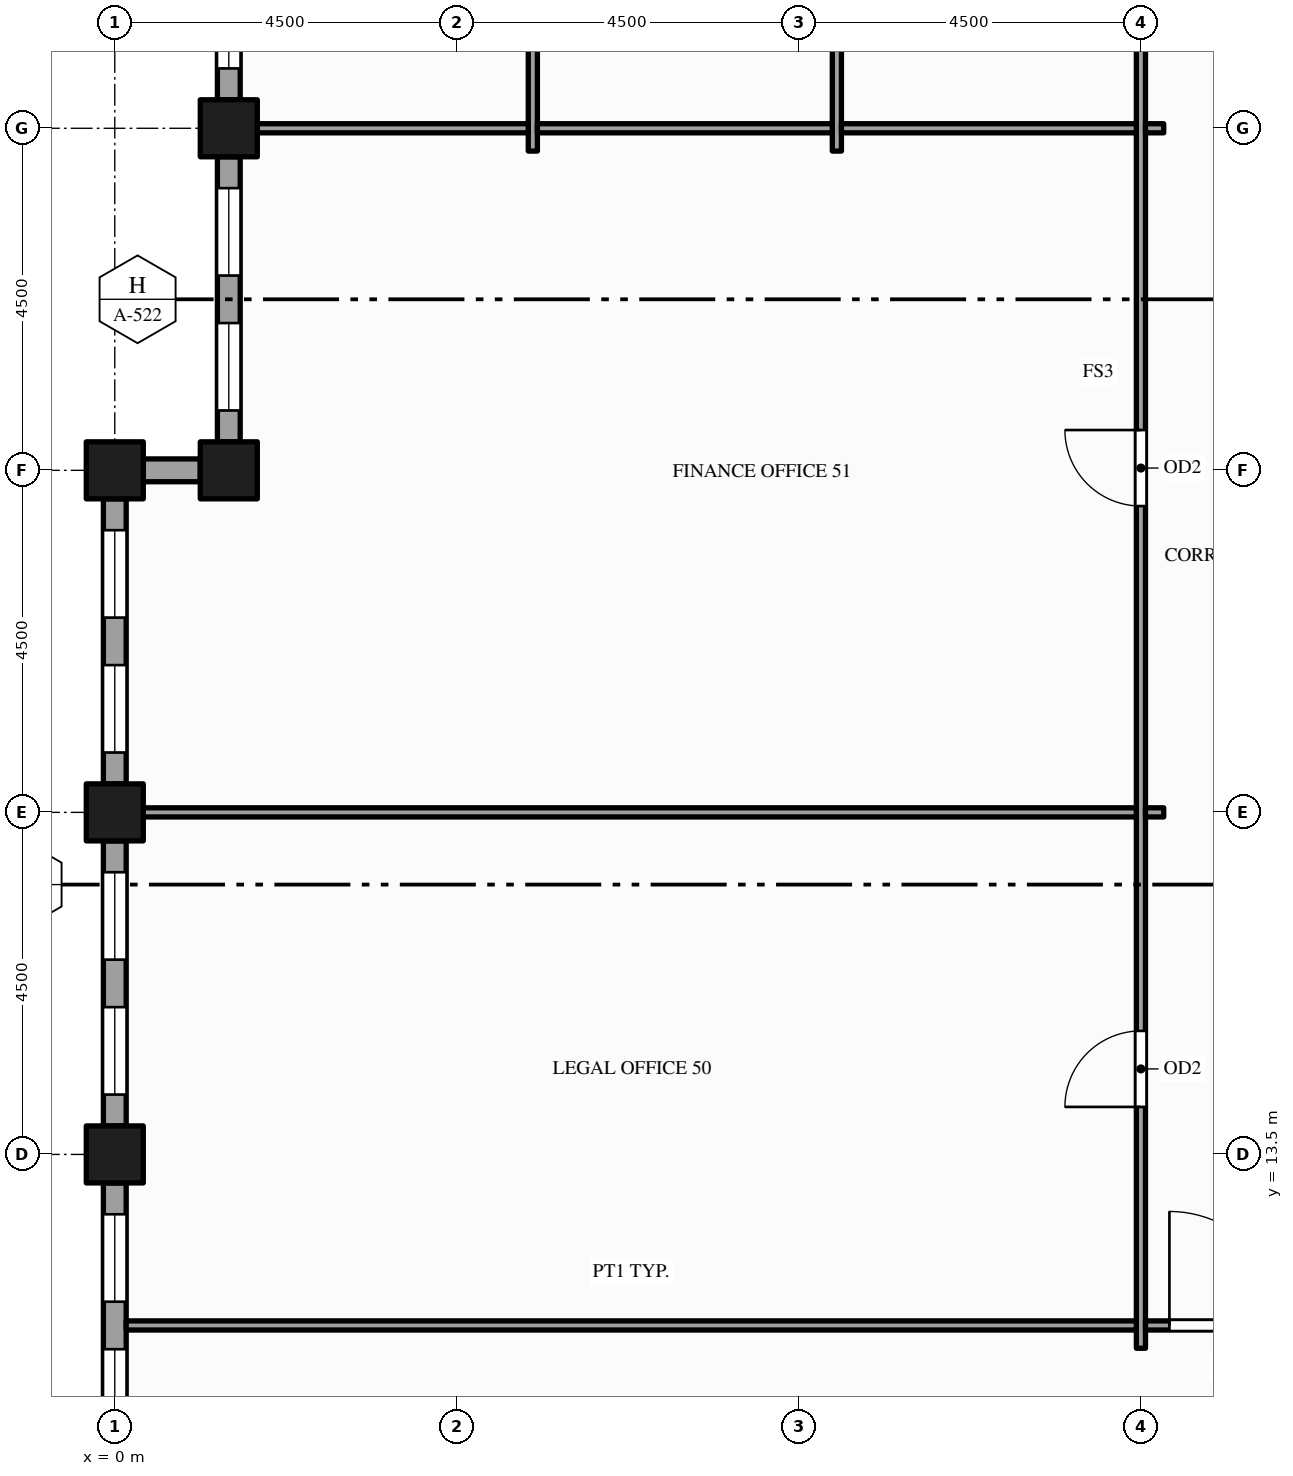
"""IFC4 building model, lengths in metres.
Left out: names, types, materials, properties, quantities, classifications, styles, units other than length and angle.
Written with IfcOpenShell. Run it as: python <this file> out.ifc"""

import sys

from ifc_helpers import new_model, si_unit, direction, frame, frame_2d, origin, origin_2d, place, context, subcontext, project, spatial, rectangle, hollow_rectangle, extrude, element, fill, save


model = new_model("IFC4")
c1 = context("Model", 3, precision=1e-05, world=origin(), true_north=direction((0.0, 1.0)))
c2 = subcontext(c1, "Body", "Model", "MODEL_VIEW")
j1 = project(units=[si_unit("LENGTHUNIT", "METRE"), si_unit("PLANEANGLEUNIT", "RADIAN")], contexts=[c1])
p1 = place(None, origin())
s1 = spatial("IfcSite", under=j1, at=p1, CompositionType="ELEMENT")
p2 = place(p1, origin())
s2 = spatial("IfcBuilding", under=s1, at=p2, CompositionType="ELEMENT")
p3 = place(p2, frame((0.0, 0.0, 227.0)))
s3 = spatial("IfcBuildingStorey", under=s2, at=p3, CompositionType="ELEMENT", Elevation=227.0)
for number, where, z_axis, x_axis in (
    (1, (0.0, 13.5, -0.15), (0.0, 0.0, 1.0), (1.0, 0.0, 0.0)),
    (2, (0.0, 18.0, -0.15), (0.0, 0.0, 1.0), (1.0, 0.0, 0.0)),
    (3, (0.0, 22.5, -0.15), (0.0, 0.0, 1.0), (1.0, 0.0, 0.0)),
    (4, (1.5, 22.5, -0.15), (0.0, 0.0, 1.0), (1.0, 0.0, 0.0)),
    (5, (1.5, 27.0, -0.15), (0.0, 0.0, 1.0), (1.0, 0.0, 0.0)),
):
    element("IfcColumn", number, at=place(p3, frame(where, z_axis=z_axis, x_axis=x_axis)), inside=s3, PredefinedType="COLUMN", context=c2, shape_type="SweptSolid", body=[
        extrude(hollow_rectangle(XDim=0.75, YDim=0.75, WallThickness=0.036, at=origin_2d()), origin(), (0.0, 0.0, 1.0), 4.0),
    ])
p4 = place(p3, frame((1.5, 31.125, 0.0), z_axis=(0.0, 0.0, 1.0), x_axis=(0.0, -1.0, 0.0)))
e6 = element("IfcWall", 6, at=p4, inside=s3, PredefinedType="STANDARD", context=c2, shape_type="SweptSolid", body=[
    extrude(rectangle(XDim=3.75, YDim=0.3, at=frame_2d((1.875, 0.0))), origin(), (0.0, 0.0, 1.0), 3.157),
])
p5 = place(p4, frame((0.413, 0.0, 0.9)))
e7 = element("IfcOpeningElement", 7, at=p5, cuts=e6, PredefinedType="OPENING", context=c2, shape_type="SweptSolid", body=[
    extrude(rectangle(XDim=1.15, YDim=2.0, at=frame_2d((0.575, 1.0))), frame((0.0, 0.16, 0.0), z_axis=(0.0, -1.0, 0.0), x_axis=(1.0, 0.0, 0.0)), (0.0, 0.0, 1.0), 0.32),
])
p6 = place(p4, frame((2.188, 0.0, 0.9)))
e8 = element("IfcOpeningElement", 8, at=p6, cuts=e6, PredefinedType="OPENING", context=c2, shape_type="SweptSolid", body=[
    extrude(rectangle(XDim=1.15, YDim=2.0, at=frame_2d((0.575, 1.0))), frame((0.0, 0.16, 0.0), z_axis=(0.0, -1.0, 0.0), x_axis=(1.0, 0.0, 0.0)), (0.0, 0.0, 1.0), 0.32),
])
p7 = place(p3, frame((1.5, 26.625, 0.0), z_axis=(0.0, 0.0, 1.0), x_axis=(0.0, -1.0, 0.0)))
e9 = element("IfcWall", 9, at=p7, inside=s3, PredefinedType="STANDARD", context=c2, shape_type="SweptSolid", body=[
    extrude(rectangle(XDim=3.75, YDim=0.3, at=frame_2d((1.875, 0.0))), origin(), (0.0, 0.0, 1.0), 3.157),
])
p8 = place(p7, frame((0.413, 0.0, 0.9)))
e10 = element("IfcOpeningElement", 10, at=p8, cuts=e9, PredefinedType="OPENING", context=c2, shape_type="SweptSolid", body=[
    extrude(rectangle(XDim=1.15, YDim=2.0, at=frame_2d((0.575, 1.0))), frame((0.0, 0.16, 0.0), z_axis=(0.0, -1.0, 0.0), x_axis=(1.0, 0.0, 0.0)), (0.0, 0.0, 1.0), 0.32),
])
p9 = place(p7, frame((2.188, 0.0, 0.9)))
e11 = element("IfcOpeningElement", 11, at=p9, cuts=e9, PredefinedType="OPENING", context=c2, shape_type="SweptSolid", body=[
    extrude(rectangle(XDim=1.15, YDim=2.0, at=frame_2d((0.575, 1.0))), frame((0.0, 0.16, 0.0), z_axis=(0.0, -1.0, 0.0), x_axis=(1.0, 0.0, 0.0)), (0.0, 0.0, 1.0), 0.32),
])
p10 = place(p3, frame((1.125, 22.5, 0.0), z_axis=(0.0, 0.0, 1.0), x_axis=(-1.0, 0.0, 0.0)))
e12 = element("IfcWall", 12, at=p10, inside=s3, PredefinedType="STANDARD", context=c2, shape_type="SweptSolid", body=[
    extrude(rectangle(XDim=0.75, YDim=0.3, at=frame_2d((0.375, 0.0))), origin(), (0.0, 0.0, 1.0), 3.157),
])
p11 = place(p3, frame((0.0, 22.125, 0.0), z_axis=(0.0, 0.0, 1.0), x_axis=(0.0, -1.0, 0.0)))
e13 = element("IfcWall", 13, at=p11, inside=s3, PredefinedType="STANDARD", context=c2, shape_type="SweptSolid", body=[
    extrude(rectangle(XDim=3.75, YDim=0.3, at=frame_2d((1.875, 0.0))), origin(), (0.0, 0.0, 1.0), 3.157),
])
p12 = place(p11, frame((0.413, 0.0, 0.9)))
e14 = element("IfcOpeningElement", 14, at=p12, cuts=e13, PredefinedType="OPENING", context=c2, shape_type="SweptSolid", body=[
    extrude(rectangle(XDim=1.15, YDim=2.0, at=frame_2d((0.575, 1.0))), frame((0.0, 0.16, 0.0), z_axis=(0.0, -1.0, 0.0), x_axis=(1.0, 0.0, 0.0)), (0.0, 0.0, 1.0), 0.32),
])
p13 = place(p11, frame((2.188, 0.0, 0.9)))
e15 = element("IfcOpeningElement", 15, at=p13, cuts=e13, PredefinedType="OPENING", context=c2, shape_type="SweptSolid", body=[
    extrude(rectangle(XDim=1.15, YDim=2.0, at=frame_2d((0.575, 1.0))), frame((0.0, 0.16, 0.0), z_axis=(0.0, -1.0, 0.0), x_axis=(1.0, 0.0, 0.0)), (0.0, 0.0, 1.0), 0.32),
])
p14 = place(p3, frame((0.0, 17.625, 0.0), z_axis=(0.0, 0.0, 1.0), x_axis=(0.0, -1.0, 0.0)))
e16 = element("IfcWall", 16, at=p14, inside=s3, PredefinedType="STANDARD", context=c2, shape_type="SweptSolid", body=[
    extrude(rectangle(XDim=3.75, YDim=0.3, at=frame_2d((1.875, 0.0))), origin(), (0.0, 0.0, 1.0), 3.157),
])
p15 = place(p14, frame((0.413, 0.0, 0.9)))
e17 = element("IfcOpeningElement", 17, at=p15, cuts=e16, PredefinedType="OPENING", context=c2, shape_type="SweptSolid", body=[
    extrude(rectangle(XDim=1.15, YDim=2.0, at=frame_2d((0.575, 1.0))), frame((0.0, 0.16, 0.0), z_axis=(0.0, -1.0, 0.0), x_axis=(1.0, 0.0, 0.0)), (0.0, 0.0, 1.0), 0.32),
])
p16 = place(p14, frame((2.188, 0.0, 0.9)))
e18 = element("IfcOpeningElement", 18, at=p16, cuts=e16, PredefinedType="OPENING", context=c2, shape_type="SweptSolid", body=[
    extrude(rectangle(XDim=1.15, YDim=2.0, at=frame_2d((0.575, 1.0))), frame((0.0, 0.16, 0.0), z_axis=(0.0, -1.0, 0.0), x_axis=(1.0, 0.0, 0.0)), (0.0, 0.0, 1.0), 0.32),
])
p17 = place(p3, frame((0.0, 13.125, 0.0), z_axis=(0.0, 0.0, 1.0), x_axis=(0.0, -1.0, 0.0)))
e19 = element("IfcWall", 19, at=p17, inside=s3, PredefinedType="STANDARD", context=c2, shape_type="SweptSolid", body=[
    extrude(rectangle(XDim=3.75, YDim=0.3, at=frame_2d((1.875, 0.0))), origin(), (0.0, 0.0, 1.0), 3.157),
])
p18 = place(p17, frame((0.413, 0.0, 0.9)))
e20 = element("IfcOpeningElement", 20, at=p18, cuts=e19, PredefinedType="OPENING", context=c2, shape_type="SweptSolid", body=[
    extrude(rectangle(XDim=1.15, YDim=2.0, at=frame_2d((0.575, 1.0))), frame((0.0, 0.16, 0.0), z_axis=(0.0, -1.0, 0.0), x_axis=(1.0, 0.0, 0.0)), (0.0, 0.0, 1.0), 0.32),
])
p19 = place(p17, frame((2.188, 0.0, 0.9)))
e21 = element("IfcOpeningElement", 21, at=p19, cuts=e19, PredefinedType="OPENING", context=c2, shape_type="SweptSolid", body=[
    extrude(rectangle(XDim=1.15, YDim=2.0, at=frame_2d((0.575, 1.0))), frame((0.0, 0.16, 0.0), z_axis=(0.0, -1.0, 0.0), x_axis=(1.0, 0.0, 0.0)), (0.0, 0.0, 1.0), 0.32),
])
for number, where, z_axis, x_axis in (
    (22, (5.5, 26.7, 0.0), (0.0, 0.0, 1.0), (0.0, 1.0, 0.0)),
    (23, (9.5, 26.7, 0.0), (0.0, 0.0, 1.0), (0.0, 1.0, 0.0)),
):
    element("IfcWall", number, at=place(p3, frame(where, z_axis=z_axis, x_axis=x_axis)), inside=s3, PredefinedType="PARTITIONING", context=c2, shape_type="SweptSolid", body=[
        extrude(rectangle(XDim=5.1, YDim=0.12, at=frame_2d((2.55, 0.0))), origin(), (0.0, 0.0, 1.0), 3.85),
    ])
p20 = place(p3, frame((13.5, 10.95, 0.0), z_axis=(0.0, 0.0, 1.0), x_axis=(0.0, 1.0, 0.0)))
e24 = element("IfcWall", 24, at=p20, inside=s3, PredefinedType="PARTITIONING", context=c2, shape_type="SweptSolid", body=[
    extrude(rectangle(XDim=20.85, YDim=0.12, at=frame_2d((10.425, 0.0))), origin(), (0.0, 0.0, 1.0), 2.6),
])
p21 = place(p20, frame((3.175, 0.0, 0.0)))
e25 = element("IfcOpeningElement", 25, at=p21, cuts=e24, PredefinedType="OPENING", context=c2, shape_type="SweptSolid", body=[
    extrude(rectangle(XDim=1.0, YDim=2.1, at=frame_2d((0.5, 1.05))), frame((0.0, 0.07, 0.0), z_axis=(0.0, -1.0, 0.0), x_axis=(1.0, 0.0, 0.0)), (0.0, 0.0, 1.0), 0.14),
])
p22 = place(p20, frame((11.08, 0.0, 0.0)))
e26 = element("IfcOpeningElement", 26, at=p22, cuts=e24, PredefinedType="OPENING", context=c2, shape_type="SweptSolid", body=[
    extrude(rectangle(XDim=1.0, YDim=2.1, at=frame_2d((0.5, 1.05))), frame((0.0, 0.07, 0.0), z_axis=(0.0, -1.0, 0.0), x_axis=(1.0, 0.0, 0.0)), (0.0, 0.0, 1.0), 0.14),
])
p23 = place(p3, frame((0.15, 11.25, 0.0), z_axis=(0.0, 0.0, 1.0), x_axis=(1.0, 0.0, 0.0)))
e27 = element("IfcWall", 27, at=p23, inside=s3, PredefinedType="PARTITIONING", context=c2, shape_type="SweptSolid", body=[
    extrude(rectangle(XDim=13.29, YDim=0.12, at=frame_2d((6.645, 0.0))), origin(), (0.0, 0.0, 1.0), 2.87),
])
p24 = place(p3, frame((13.56, 11.25, 0.0), z_axis=(0.0, 0.0, 1.0), x_axis=(1.0, 0.0, 0.0)))
e28 = element("IfcWall", 28, at=p24, inside=s3, PredefinedType="PARTITIONING", context=c2, shape_type="SweptSolid", body=[
    extrude(rectangle(XDim=2.13, YDim=0.12, at=frame_2d((1.065, 0.0))), origin(), (0.0, 0.0, 1.0), 2.87),
])
p25 = place(p24, frame((0.315, 0.0, 0.0)))
e29 = element("IfcOpeningElement", 29, at=p25, cuts=e28, PredefinedType="OPENING", context=c2, shape_type="SweptSolid", body=[
    extrude(rectangle(XDim=1.5, YDim=2.1, at=frame_2d((0.75, 1.05))), frame((0.0, 0.07, 0.0), z_axis=(0.0, -1.0, 0.0), x_axis=(1.0, 0.0, 0.0)), (0.0, 0.0, 1.0), 0.14),
])
p26 = place(p3, frame((0.15, 18.0, 0.0), z_axis=(0.0, 0.0, 1.0), x_axis=(1.0, 0.0, 0.0)))
e30 = element("IfcWall", 30, at=p26, inside=s3, PredefinedType="PARTITIONING", context=c2, shape_type="SweptSolid", body=[
    extrude(rectangle(XDim=13.29, YDim=0.12, at=frame_2d((6.645, 0.0))), origin(), (0.0, 0.0, 1.0), 2.87),
])
p27 = place(p3, frame((13.56, 18.0, 0.0), z_axis=(0.0, 0.0, 1.0), x_axis=(1.0, 0.0, 0.0)))
e31 = element("IfcWall", 31, at=p27, inside=s3, PredefinedType="PARTITIONING", context=c2, shape_type="SweptSolid", body=[
    extrude(rectangle(XDim=0.24, YDim=0.12, at=frame_2d((0.12, 0.0))), origin(), (0.0, 0.0, 1.0), 2.87),
])
p28 = place(p3, frame((1.65, 27.0, 0.0), z_axis=(0.0, 0.0, 1.0), x_axis=(1.0, 0.0, 0.0)))
e32 = element("IfcWall", 32, at=p28, inside=s3, PredefinedType="PARTITIONING", context=c2, shape_type="SweptSolid", body=[
    extrude(rectangle(XDim=3.79, YDim=0.12, at=frame_2d((1.895, 0.0))), origin(), (0.0, 0.0, 1.0), 2.87),
])
for number, where, z_axis, x_axis in (
    (33, (5.56, 27.0, 0.0), (0.0, 0.0, 1.0), (1.0, 0.0, 0.0)),
    (34, (9.56, 27.0, 0.0), (0.0, 0.0, 1.0), (1.0, 0.0, 0.0)),
):
    element("IfcWall", number, at=place(p3, frame(where, z_axis=z_axis, x_axis=x_axis)), inside=s3, PredefinedType="PARTITIONING", context=c2, shape_type="SweptSolid", body=[
        extrude(rectangle(XDim=3.88, YDim=0.12, at=frame_2d((1.94, 0.0))), origin(), (0.0, 0.0, 1.0), 2.87),
    ])
p29 = place(p3, frame((13.56, 27.0, 0.0), z_axis=(0.0, 0.0, 1.0), x_axis=(1.0, 0.0, 0.0)))
e35 = element("IfcWall", 35, at=p29, inside=s3, PredefinedType="PARTITIONING", context=c2, shape_type="SweptSolid", body=[
    extrude(rectangle(XDim=0.24, YDim=0.12, at=frame_2d((0.12, 0.0))), origin(), (0.0, 0.0, 1.0), 2.87),
])
p30 = place(p6, origin())
e36 = element("IfcWindow", 36, at=p30, inside=s3, PartitioningType="SINGLE_PANEL", PredefinedType="WINDOW", context=c2, shape_type="SweptSolid", body=[
    extrude(rectangle(XDim=1.15, YDim=2.0, at=frame_2d((0.575, 1.0))), frame((0.0, 0.03, 0.0), z_axis=(0.0, -1.0, 0.0), x_axis=(1.0, 0.0, 0.0)), (0.0, 0.0, 1.0), 0.06),
])
fill(e8, e36)
p31 = place(p8, origin())
e37 = element("IfcWindow", 37, at=p31, inside=s3, PartitioningType="SINGLE_PANEL", PredefinedType="WINDOW", context=c2, shape_type="SweptSolid", body=[
    extrude(rectangle(XDim=1.15, YDim=2.0, at=frame_2d((0.575, 1.0))), frame((0.0, 0.03, 0.0), z_axis=(0.0, -1.0, 0.0), x_axis=(1.0, 0.0, 0.0)), (0.0, 0.0, 1.0), 0.06),
])
fill(e10, e37)
p32 = place(p9, origin())
e38 = element("IfcWindow", 38, at=p32, inside=s3, PartitioningType="SINGLE_PANEL", PredefinedType="WINDOW", context=c2, shape_type="SweptSolid", body=[
    extrude(rectangle(XDim=1.15, YDim=2.0, at=frame_2d((0.575, 1.0))), frame((0.0, 0.03, 0.0), z_axis=(0.0, -1.0, 0.0), x_axis=(1.0, 0.0, 0.0)), (0.0, 0.0, 1.0), 0.06),
])
fill(e11, e38)
p33 = place(p12, origin())
e39 = element("IfcWindow", 39, at=p33, inside=s3, PartitioningType="SINGLE_PANEL", PredefinedType="WINDOW", context=c2, shape_type="SweptSolid", body=[
    extrude(rectangle(XDim=1.15, YDim=2.0, at=frame_2d((0.575, 1.0))), frame((0.0, 0.03, 0.0), z_axis=(0.0, -1.0, 0.0), x_axis=(1.0, 0.0, 0.0)), (0.0, 0.0, 1.0), 0.06),
])
fill(e14, e39)
p34 = place(p13, origin())
e40 = element("IfcWindow", 40, at=p34, inside=s3, PartitioningType="SINGLE_PANEL", PredefinedType="WINDOW", context=c2, shape_type="SweptSolid", body=[
    extrude(rectangle(XDim=1.15, YDim=2.0, at=frame_2d((0.575, 1.0))), frame((0.0, 0.03, 0.0), z_axis=(0.0, -1.0, 0.0), x_axis=(1.0, 0.0, 0.0)), (0.0, 0.0, 1.0), 0.06),
])
fill(e15, e40)
p35 = place(p15, origin())
e41 = element("IfcWindow", 41, at=p35, inside=s3, PartitioningType="SINGLE_PANEL", PredefinedType="WINDOW", context=c2, shape_type="SweptSolid", body=[
    extrude(rectangle(XDim=1.15, YDim=2.0, at=frame_2d((0.575, 1.0))), frame((0.0, 0.03, 0.0), z_axis=(0.0, -1.0, 0.0), x_axis=(1.0, 0.0, 0.0)), (0.0, 0.0, 1.0), 0.06),
])
fill(e17, e41)
p36 = place(p16, origin())
e42 = element("IfcWindow", 42, at=p36, inside=s3, PartitioningType="SINGLE_PANEL", PredefinedType="WINDOW", context=c2, shape_type="SweptSolid", body=[
    extrude(rectangle(XDim=1.15, YDim=2.0, at=frame_2d((0.575, 1.0))), frame((0.0, 0.03, 0.0), z_axis=(0.0, -1.0, 0.0), x_axis=(1.0, 0.0, 0.0)), (0.0, 0.0, 1.0), 0.06),
])
fill(e18, e42)
p37 = place(p18, origin())
e43 = element("IfcWindow", 43, at=p37, inside=s3, PartitioningType="SINGLE_PANEL", PredefinedType="WINDOW", context=c2, shape_type="SweptSolid", body=[
    extrude(rectangle(XDim=1.15, YDim=2.0, at=frame_2d((0.575, 1.0))), frame((0.0, 0.03, 0.0), z_axis=(0.0, -1.0, 0.0), x_axis=(1.0, 0.0, 0.0)), (0.0, 0.0, 1.0), 0.06),
])
fill(e20, e43)
p38 = place(p19, origin())
e44 = element("IfcWindow", 44, at=p38, inside=s3, PartitioningType="SINGLE_PANEL", PredefinedType="WINDOW", context=c2, shape_type="SweptSolid", body=[
    extrude(rectangle(XDim=1.15, YDim=2.0, at=frame_2d((0.575, 1.0))), frame((0.0, 0.03, 0.0), z_axis=(0.0, -1.0, 0.0), x_axis=(1.0, 0.0, 0.0)), (0.0, 0.0, 1.0), 0.06),
])
fill(e21, e44)
p39 = place(p25, origin())
e45 = element("IfcDoor", 45, at=p39, inside=s3, OperationType="SINGLE_SWING_LEFT", PredefinedType="DOOR", context=c2, shape_type="SweptSolid", body=[
    extrude(rectangle(XDim=1.5, YDim=2.1, at=frame_2d((0.75, 1.05))), frame((0.0, 0.025, 0.0), z_axis=(0.0, -1.0, 0.0), x_axis=(1.0, 0.0, 0.0)), (0.0, 0.0, 1.0), 0.05),
])
fill(e29, e45)
p40 = place(p21, origin())
e46 = element("IfcDoor", 46, at=p40, inside=s3, OperationType="SINGLE_SWING_LEFT", PredefinedType="DOOR", context=c2, shape_type="SweptSolid", body=[
    extrude(rectangle(XDim=1.0, YDim=2.1, at=frame_2d((0.5, 1.05))), frame((0.0, 0.025, 0.0), z_axis=(0.0, -1.0, 0.0), x_axis=(1.0, 0.0, 0.0)), (0.0, 0.0, 1.0), 0.05),
])
fill(e25, e46)
p41 = place(p22, origin())
e47 = element("IfcDoor", 47, at=p41, inside=s3, OperationType="SINGLE_SWING_RIGHT", PredefinedType="DOOR", context=c2, shape_type="SweptSolid", body=[
    extrude(rectangle(XDim=1.0, YDim=2.1, at=frame_2d((0.5, 1.05))), frame((0.0, 0.025, 0.0), z_axis=(0.0, -1.0, 0.0), x_axis=(1.0, 0.0, 0.0)), (0.0, 0.0, 1.0), 0.05),
])
fill(e26, e47)
save(model, sys.argv[1])
